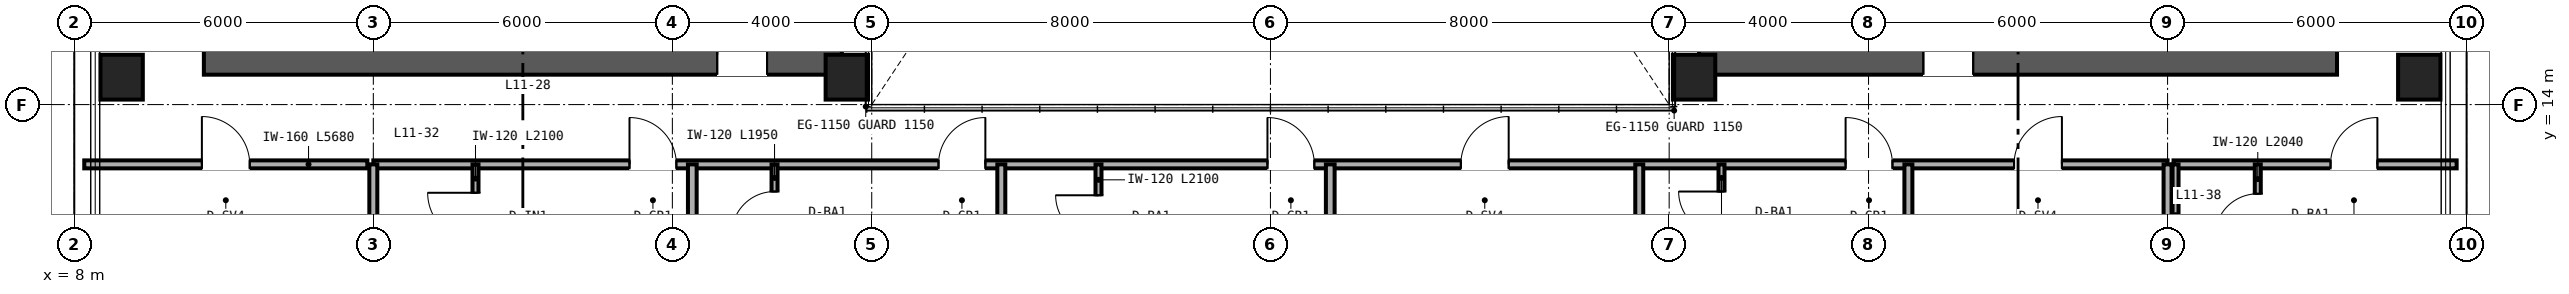
"""IFC4 building model, lengths in metres.
Left out: names, types, materials, properties, quantities, classifications, styles, units other than length and angle.
Written with IfcOpenShell. Run it as: python <this file> out.ifc"""

import sys

from ifc_helpers import new_model, si_unit, direction, frame, frame_2d, origin, origin_2d, place, context, subcontext, project, spatial, rectangle, hollow_rectangle, extrude, source, transform, mapped, element, fill, save


model = new_model("IFC4")
c1 = context("Model", 3, precision=1e-05, world=origin(), true_north=direction((0.0, 1.0)))
c2 = subcontext(c1, "Body", "Model", "MODEL_VIEW")
j1 = project(units=[si_unit("LENGTHUNIT", "METRE"), si_unit("PLANEANGLEUNIT", "RADIAN")], contexts=[c1])
p1 = place(None, origin())
s1 = spatial("IfcSite", under=j1, at=p1, CompositionType="ELEMENT")
p2 = place(p1, origin())
s2 = spatial("IfcBuilding", under=s1, at=p2, CompositionType="ELEMENT")
p3 = place(p2, frame((0.0, 0.0, 49.2)))
s3 = spatial("IfcBuildingStorey", under=s2, at=p3, CompositionType="ELEMENT", Elevation=49.2)
p4 = place(p3, frame((10.6, 15.0, 0.0), z_axis=(0.0, 0.0, 1.0), x_axis=(1.0, 0.0, 0.0)))
e1 = element("IfcWall", 1, at=p4, inside=s3, PredefinedType="SHEAR", context=c2, shape_type="SweptSolid", body=[
    extrude(rectangle(XDim=12.8, YDim=0.8, at=frame_2d((6.4, 0.0))), origin(), (0.0, 0.0, 1.0), 3.35),
])
p5 = place(p4, frame((10.3, 0.0, 0.0)))
e2 = element("IfcOpeningElement", 2, at=p5, cuts=e1, PredefinedType="OPENING", context=c2, shape_type="SweptSolid", body=[
    extrude(rectangle(XDim=1.0, YDim=2.15, at=frame_2d((0.5, 1.075))), frame((0.0, 0.41, 0.0), z_axis=(0.0, -1.0, 0.0), x_axis=(1.0, 0.0, 0.0)), (0.0, 0.0, 1.0), 0.82),
])
p6 = place(p3, frame((40.6, 15.0, 0.0), z_axis=(0.0, 0.0, 1.0), x_axis=(1.0, 0.0, 0.0)))
e3 = element("IfcWall", 3, at=p6, inside=s3, PredefinedType="SHEAR", context=c2, shape_type="SweptSolid", body=[
    extrude(rectangle(XDim=12.8, YDim=0.8, at=frame_2d((6.4, 0.0))), origin(), (0.0, 0.0, 1.0), 3.35),
])
p7 = place(p6, frame((4.5, 0.0, 0.0)))
e4 = element("IfcOpeningElement", 4, at=p7, cuts=e3, PredefinedType="OPENING", context=c2, shape_type="SweptSolid", body=[
    extrude(rectangle(XDim=1.0, YDim=2.15, at=frame_2d((0.5, 1.075))), frame((0.0, 0.41, 0.0), z_axis=(0.0, -1.0, 0.0), x_axis=(1.0, 0.0, 0.0)), (0.0, 0.0, 1.0), 0.82),
])
m1 = source(origin(), c2, "Body", "SweptSolid", [
    extrude(hollow_rectangle(XDim=0.85, YDim=0.9, WallThickness=0.04, at=origin_2d()), origin(), (0.0, 0.0, 1.0), 3.35),
])
for number, where, z_axis, x_axis in (
    (5, (8.95, 14.55, 0.0), (0.0, 0.0, 1.0), (1.0, 0.0, 0.0)),
    (6, (23.5, 14.55, 0.0), (0.0, 0.0, 1.0), (1.0, 0.0, 0.0)),
    (7, (40.5, 14.55, 0.0), (0.0, 0.0, 1.0), (1.0, 0.0, 0.0)),
    (8, (55.05, 14.55, 0.0), (0.0, 0.0, 1.0), (1.0, 0.0, 0.0)),
):
    element("IfcColumn", number, at=place(p3, frame(where, z_axis=z_axis, x_axis=x_axis)), inside=s3, PredefinedType="COLUMN", context=c2, shape_type="MappedRepresentation", body=[
        mapped(m1, transform((0.0, 0.0, 0.0), scale=1.0)),
    ])
p8 = place(p3, frame((8.2, 12.8, 0.0), z_axis=(0.0, 0.0, 1.0), x_axis=(1.0, 0.0, 0.0)))
e9 = element("IfcWall", 9, at=p8, inside=s3, PredefinedType="PARTITIONING", context=c2, shape_type="SweptSolid", body=[
    extrude(rectangle(XDim=5.68, YDim=0.16, at=frame_2d((2.84, 0.0))), origin(), (0.0, 0.0, 1.0), 3.35),
])
p9 = place(p8, frame((2.36, 0.0, 0.0)))
e10 = element("IfcOpeningElement", 10, at=p9, cuts=e9, PredefinedType="OPENING", context=c2, shape_type="SweptSolid", body=[
    extrude(rectangle(XDim=0.96, YDim=2.15, at=frame_2d((0.48, 1.075))), frame((0.0, 0.09, 0.0), z_axis=(0.0, -1.0, 0.0), x_axis=(1.0, 0.0, 0.0)), (0.0, 0.0, 1.0), 0.18),
])
p10 = place(p3, frame((50.12, 12.8, 0.0), z_axis=(0.0, 0.0, 1.0), x_axis=(1.0, 0.0, 0.0)))
e11 = element("IfcWall", 11, at=p10, inside=s3, PredefinedType="PARTITIONING", context=c2, shape_type="SweptSolid", body=[
    extrude(rectangle(XDim=5.68, YDim=0.16, at=frame_2d((2.84, 0.0))), origin(), (0.0, 0.0, 1.0), 3.35),
])
p11 = place(p10, frame((3.15, 0.0, 0.0)))
e12 = element("IfcOpeningElement", 12, at=p11, cuts=e11, PredefinedType="OPENING", context=c2, shape_type="SweptSolid", body=[
    extrude(rectangle(XDim=0.94, YDim=2.15, at=frame_2d((0.47, 1.075))), frame((0.0, 0.09, 0.0), z_axis=(0.0, -1.0, 0.0), x_axis=(1.0, 0.0, 0.0)), (0.0, 0.0, 1.0), 0.18),
])
p12 = place(p3, frame((51.81, 10.76, 0.0), z_axis=(0.0, 0.0, 1.0), x_axis=(0.0, 1.0, 0.0)))
e13 = element("IfcWall", 13, at=p12, inside=s3, PredefinedType="PARTITIONING", context=c2, shape_type="SweptSolid", body=[
    extrude(rectangle(XDim=2.04, YDim=0.12, at=frame_2d((1.02, 0.0))), origin(), (0.0, 0.0, 1.0), 3.35),
])
p13 = place(p12, frame((0.59, 0.0, 0.0)))
e14 = element("IfcOpeningElement", 14, at=p13, cuts=e13, PredefinedType="OPENING", context=c2, shape_type="SweptSolid", body=[
    extrude(rectangle(XDim=0.86, YDim=2.1, at=frame_2d((0.43, 1.05))), frame((0.0, 0.07, 0.0), z_axis=(0.0, -1.0, 0.0), x_axis=(1.0, 0.0, 0.0)), (0.0, 0.0, 1.0), 0.14),
])
p14 = place(p3, frame((50.16, 10.76, 0.0), z_axis=(0.0, 0.0, 1.0), x_axis=(0.0, 1.0, 0.0)))
e15 = element("IfcWall", 15, at=p14, inside=s3, PredefinedType="PARTITIONING", context=c2, shape_type="SweptSolid", body=[
    extrude(rectangle(XDim=2.04, YDim=0.12, at=frame_2d((1.02, 0.0))), origin(), (0.0, 0.0, 1.0), 3.35),
])
p15 = place(p3, frame((14.0, 12.8, 0.0), z_axis=(0.0, 0.0, 1.0), x_axis=(1.0, 0.0, 0.0)))
e16 = element("IfcWall", 16, at=p15, inside=s3, PredefinedType="PARTITIONING", context=c2, shape_type="SweptSolid", body=[
    extrude(rectangle(XDim=36.0, YDim=0.16, at=frame_2d((18.0, 0.0))), origin(), (0.0, 0.0, 1.0), 2.571),
])
p16 = place(p15, frame((5.14, 0.0, 0.0)))
e17 = element("IfcOpeningElement", 17, at=p16, cuts=e16, PredefinedType="OPENING", context=c2, shape_type="SweptSolid", body=[
    extrude(rectangle(XDim=0.94, YDim=2.15, at=frame_2d((0.47, 1.075))), frame((0.0, 0.09, 0.0), z_axis=(0.0, -1.0, 0.0), x_axis=(1.0, 0.0, 0.0)), (0.0, 0.0, 1.0), 0.18),
])
p17 = place(p15, frame((11.34, 0.0, 0.0)))
e18 = element("IfcOpeningElement", 18, at=p17, cuts=e16, PredefinedType="OPENING", context=c2, shape_type="SweptSolid", body=[
    extrude(rectangle(XDim=0.94, YDim=2.15, at=frame_2d((0.47, 1.075))), frame((0.0, 0.09, 0.0), z_axis=(0.0, -1.0, 0.0), x_axis=(1.0, 0.0, 0.0)), (0.0, 0.0, 1.0), 0.18),
])
p18 = place(p15, frame((17.94, 0.0, 0.0)))
e19 = element("IfcOpeningElement", 19, at=p18, cuts=e16, PredefinedType="OPENING", context=c2, shape_type="SweptSolid", body=[
    extrude(rectangle(XDim=0.94, YDim=2.15, at=frame_2d((0.47, 1.075))), frame((0.0, 0.09, 0.0), z_axis=(0.0, -1.0, 0.0), x_axis=(1.0, 0.0, 0.0)), (0.0, 0.0, 1.0), 0.18),
])
p19 = place(p15, frame((21.82, 0.0, 0.0)))
e20 = element("IfcOpeningElement", 20, at=p19, cuts=e16, PredefinedType="OPENING", context=c2, shape_type="SweptSolid", body=[
    extrude(rectangle(XDim=0.96, YDim=2.15, at=frame_2d((0.48, 1.075))), frame((0.0, 0.09, 0.0), z_axis=(0.0, -1.0, 0.0), x_axis=(1.0, 0.0, 0.0)), (0.0, 0.0, 1.0), 0.18),
])
p20 = place(p15, frame((29.54, 0.0, 0.0)))
e21 = element("IfcOpeningElement", 21, at=p20, cuts=e16, PredefinedType="OPENING", context=c2, shape_type="SweptSolid", body=[
    extrude(rectangle(XDim=0.94, YDim=2.15, at=frame_2d((0.47, 1.075))), frame((0.0, 0.09, 0.0), z_axis=(0.0, -1.0, 0.0), x_axis=(1.0, 0.0, 0.0)), (0.0, 0.0, 1.0), 0.18),
])
p21 = place(p15, frame((32.92, 0.0, 0.0)))
e22 = element("IfcOpeningElement", 22, at=p21, cuts=e16, PredefinedType="OPENING", context=c2, shape_type="SweptSolid", body=[
    extrude(rectangle(XDim=0.96, YDim=2.15, at=frame_2d((0.48, 1.075))), frame((0.0, 0.09, 0.0), z_axis=(0.0, -1.0, 0.0), x_axis=(1.0, 0.0, 0.0)), (0.0, 0.0, 1.0), 0.18),
])
for number, where, z_axis, x_axis in (
    (23, (14.0, 2.36, 0.0), (0.0, 0.0, 1.0), (0.0, 1.0, 0.0)),
    (24, (50.0, 2.36, 0.0), (0.0, 0.0, 1.0), (0.0, 1.0, 0.0)),
):
    element("IfcWall", number, at=place(p3, frame(where, z_axis=z_axis, x_axis=x_axis)), inside=s3, PredefinedType="PARTITIONING", context=c2, shape_type="SweptSolid", body=[
        extrude(rectangle(XDim=10.44, YDim=0.16, at=frame_2d((5.22, 0.0))), origin(), (0.0, 0.0, 1.0), 2.657),
    ])
p22 = place(p3, frame((20.4, 2.36, 0.0), z_axis=(0.0, 0.0, 1.0), x_axis=(0.0, 1.0, 0.0)))
e25 = element("IfcWall", 25, at=p22, inside=s3, PredefinedType="PARTITIONING", context=c2, shape_type="SweptSolid", body=[
    extrude(rectangle(XDim=10.44, YDim=0.175, at=frame_2d((5.22, 0.0))), origin(), (0.0, 0.0, 1.0), 2.813),
])
p23 = place(p3, frame((16.05, 10.7, 0.0), z_axis=(0.0, 0.0, 1.0), x_axis=(0.0, 1.0, 0.0)))
e26 = element("IfcWall", 26, at=p23, inside=s3, PredefinedType="PARTITIONING", context=c2, shape_type="SweptSolid", body=[
    extrude(rectangle(XDim=2.1, YDim=0.12, at=frame_2d((1.05, 0.0))), origin(), (0.0, 0.0, 1.0), 3.35),
])
p24 = place(p23, frame((0.57, 0.0, 0.0)))
e27 = element("IfcOpeningElement", 27, at=p24, cuts=e26, PredefinedType="OPENING", context=c2, shape_type="SweptSolid", body=[
    extrude(rectangle(XDim=0.96, YDim=2.15, at=frame_2d((0.48, 1.075))), frame((0.0, 0.07, 0.0), z_axis=(0.0, -1.0, 0.0), x_axis=(1.0, 0.0, 0.0)), (0.0, 0.0, 1.0), 0.14),
])
p25 = place(p3, frame((26.6, 2.36, 0.0), z_axis=(0.0, 0.0, 1.0), x_axis=(0.0, 1.0, 0.0)))
e28 = element("IfcWall", 28, at=p25, inside=s3, PredefinedType="PARTITIONING", context=c2, shape_type="SweptSolid", body=[
    extrude(rectangle(XDim=10.44, YDim=0.16, at=frame_2d((5.22, 0.0))), origin(), (0.0, 0.0, 1.0), 2.423),
])
p26 = place(p3, frame((22.05, 10.85, 0.0), z_axis=(0.0, 0.0, 1.0), x_axis=(0.0, 1.0, 0.0)))
e29 = element("IfcWall", 29, at=p26, inside=s3, PredefinedType="PARTITIONING", context=c2, shape_type="SweptSolid", body=[
    extrude(rectangle(XDim=1.95, YDim=0.12, at=frame_2d((0.975, 0.0))), origin(), (0.0, 0.0, 1.0), 3.35),
])
p27 = place(p26, frame((0.545, 0.0, 0.0)))
e30 = element("IfcOpeningElement", 30, at=p27, cuts=e29, PredefinedType="OPENING", context=c2, shape_type="SweptSolid", body=[
    extrude(rectangle(XDim=0.86, YDim=2.1, at=frame_2d((0.43, 1.05))), frame((0.0, 0.07, 0.0), z_axis=(0.0, -1.0, 0.0), x_axis=(1.0, 0.0, 0.0)), (0.0, 0.0, 1.0), 0.14),
])
p28 = place(p3, frame((33.2, 2.36, 0.0), z_axis=(0.0, 0.0, 1.0), x_axis=(0.0, 1.0, 0.0)))
e31 = element("IfcWall", 31, at=p28, inside=s3, PredefinedType="PARTITIONING", context=c2, shape_type="SweptSolid", body=[
    extrude(rectangle(XDim=10.44, YDim=0.175, at=frame_2d((5.22, 0.0))), origin(), (0.0, 0.0, 1.0), 2.423),
])
p29 = place(p3, frame((28.55, 10.7, 0.0), z_axis=(0.0, 0.0, 1.0), x_axis=(0.0, 1.0, 0.0)))
e32 = element("IfcWall", 32, at=p29, inside=s3, PredefinedType="PARTITIONING", context=c2, shape_type="SweptSolid", body=[
    extrude(rectangle(XDim=2.1, YDim=0.12, at=frame_2d((1.05, 0.0))), origin(), (0.0, 0.0, 1.0), 3.35),
])
p30 = place(p29, frame((0.62, 0.0, 0.0)))
e33 = element("IfcOpeningElement", 33, at=p30, cuts=e32, PredefinedType="OPENING", context=c2, shape_type="SweptSolid", body=[
    extrude(rectangle(XDim=0.86, YDim=2.1, at=frame_2d((0.43, 1.05))), frame((0.0, 0.07, 0.0), z_axis=(0.0, -1.0, 0.0), x_axis=(1.0, 0.0, 0.0)), (0.0, 0.0, 1.0), 0.14),
])
p31 = place(p3, frame((39.4, 2.36, 0.0), z_axis=(0.0, 0.0, 1.0), x_axis=(0.0, 1.0, 0.0)))
e34 = element("IfcWall", 34, at=p31, inside=s3, PredefinedType="PARTITIONING", context=c2, shape_type="SweptSolid", body=[
    extrude(rectangle(XDim=10.44, YDim=0.16, at=frame_2d((5.22, 0.0))), origin(), (0.0, 0.0, 1.0), 2.423),
])
p32 = place(p3, frame((44.8, 2.36, 0.0), z_axis=(0.0, 0.0, 1.0), x_axis=(0.0, 1.0, 0.0)))
e35 = element("IfcWall", 35, at=p32, inside=s3, PredefinedType="PARTITIONING", context=c2, shape_type="SweptSolid", body=[
    extrude(rectangle(XDim=10.44, YDim=0.16, at=frame_2d((5.22, 0.0))), origin(), (0.0, 0.0, 1.0), 2.657),
])
p33 = place(p3, frame((41.05, 10.85, 0.0), z_axis=(0.0, 0.0, 1.0), x_axis=(0.0, 1.0, 0.0)))
e36 = element("IfcWall", 36, at=p33, inside=s3, PredefinedType="PARTITIONING", context=c2, shape_type="SweptSolid", body=[
    extrude(rectangle(XDim=1.95, YDim=0.12, at=frame_2d((0.975, 0.0))), origin(), (0.0, 0.0, 1.0), 3.35),
])
p34 = place(p33, frame((0.545, 0.0, 0.0)))
e37 = element("IfcOpeningElement", 37, at=p34, cuts=e36, PredefinedType="OPENING", context=c2, shape_type="SweptSolid", body=[
    extrude(rectangle(XDim=0.86, YDim=2.1, at=frame_2d((0.43, 1.05))), frame((0.0, 0.07, 0.0), z_axis=(0.0, -1.0, 0.0), x_axis=(1.0, 0.0, 0.0)), (0.0, 0.0, 1.0), 0.14),
])
m2 = source(origin(), c2, "Body", "SweptSolid", [
    extrude(rectangle(XDim=1.0, YDim=2.15, at=frame_2d((0.5, 1.075))), frame((0.0, 0.025, 0.0), z_axis=(0.0, -1.0, 0.0), x_axis=(1.0, 0.0, 0.0)), (0.0, 0.0, 1.0), 0.05),
])
p35 = place(p5, origin())
e38 = element("IfcDoor", 38, at=p35, inside=s3, OperationType="SINGLE_SWING_LEFT", PredefinedType="DOOR", context=c2, shape_type="MappedRepresentation", body=[
    mapped(m2, transform((0.0, 0.0, 0.0), scale=1.0)),
])
fill(e2, e38)
p36 = place(p7, origin())
e39 = element("IfcDoor", 39, at=p36, inside=s3, OperationType="SINGLE_SWING_RIGHT", PredefinedType="DOOR", context=c2, shape_type="MappedRepresentation", body=[
    mapped(m2, transform((0.0, 0.0, 0.0), scale=1.0)),
])
fill(e4, e39)
m3 = source(origin(), c2, "Body", "SweptSolid", [
    extrude(rectangle(XDim=0.96, YDim=2.15, at=frame_2d((0.48, 1.075))), frame((0.0, 0.025, 0.0), z_axis=(0.0, -1.0, 0.0), x_axis=(1.0, 0.0, 0.0)), (0.0, 0.0, 1.0), 0.05),
])
p37 = place(p9, origin())
e40 = element("IfcDoor", 40, at=p37, inside=s3, OperationType="SINGLE_SWING_LEFT", PredefinedType="DOOR", context=c2, shape_type="MappedRepresentation", body=[
    mapped(m3, transform((0.0, 0.0, 0.0), scale=1.0)),
])
fill(e10, e40)
m4 = source(origin(), c2, "Body", "SweptSolid", [
    extrude(rectangle(XDim=0.86, YDim=2.1, at=frame_2d((0.43, 1.05))), frame((0.0, 0.025, 0.0), z_axis=(0.0, -1.0, 0.0), x_axis=(1.0, 0.0, 0.0)), (0.0, 0.0, 1.0), 0.05),
])
p38 = place(p13, origin())
e41 = element("IfcDoor", 41, at=p38, inside=s3, OperationType="SINGLE_SWING_LEFT", PredefinedType="DOOR", context=c2, shape_type="MappedRepresentation", body=[
    mapped(m4, transform((0.0, 0.0, 0.0), scale=1.0)),
])
fill(e14, e41)
m5 = source(origin(), c2, "Body", "SweptSolid", [
    extrude(rectangle(XDim=0.94, YDim=2.15, at=frame_2d((0.47, 1.075))), frame((0.0, 0.025, 0.0), z_axis=(0.0, -1.0, 0.0), x_axis=(1.0, 0.0, 0.0)), (0.0, 0.0, 1.0), 0.05),
])
p39 = place(p11, origin())
e42 = element("IfcDoor", 42, at=p39, inside=s3, OperationType="SINGLE_SWING_RIGHT", PredefinedType="DOOR", context=c2, shape_type="MappedRepresentation", body=[
    mapped(m5, transform((0.0, 0.0, 0.0), scale=1.0)),
])
fill(e12, e42)
p40 = place(p24, origin())
e43 = element("IfcDoor", 43, at=p40, inside=s3, OperationType="SINGLE_SWING_RIGHT", PredefinedType="DOOR", context=c2, shape_type="MappedRepresentation", body=[
    mapped(m3, transform((0.0, 0.0, 0.0), scale=1.0)),
])
fill(e27, e43)
p41 = place(p27, origin())
e44 = element("IfcDoor", 44, at=p41, inside=s3, OperationType="SINGLE_SWING_LEFT", PredefinedType="DOOR", context=c2, shape_type="MappedRepresentation", body=[
    mapped(m4, transform((0.0, 0.0, 0.0), scale=1.0)),
])
fill(e30, e44)
p42 = place(p30, origin())
e45 = element("IfcDoor", 45, at=p42, inside=s3, OperationType="SINGLE_SWING_RIGHT", PredefinedType="DOOR", context=c2, shape_type="MappedRepresentation", body=[
    mapped(m4, transform((0.0, 0.0, 0.0), scale=1.0)),
])
fill(e33, e45)
p43 = place(p34, origin())
e46 = element("IfcDoor", 46, at=p43, inside=s3, OperationType="SINGLE_SWING_RIGHT", PredefinedType="DOOR", context=c2, shape_type="MappedRepresentation", body=[
    mapped(m4, transform((0.0, 0.0, 0.0), scale=1.0)),
])
fill(e37, e46)
p44 = place(p16, origin())
e47 = element("IfcDoor", 47, at=p44, inside=s3, OperationType="SINGLE_SWING_LEFT", PredefinedType="DOOR", context=c2, shape_type="MappedRepresentation", body=[
    mapped(m5, transform((0.0, 0.0, 0.0), scale=1.0)),
])
fill(e17, e47)
p45 = place(p17, origin())
e48 = element("IfcDoor", 48, at=p45, inside=s3, OperationType="SINGLE_SWING_RIGHT", PredefinedType="DOOR", context=c2, shape_type="MappedRepresentation", body=[
    mapped(m5, transform((0.0, 0.0, 0.0), scale=1.0)),
])
fill(e18, e48)
p46 = place(p18, origin())
e49 = element("IfcDoor", 49, at=p46, inside=s3, OperationType="SINGLE_SWING_LEFT", PredefinedType="DOOR", context=c2, shape_type="MappedRepresentation", body=[
    mapped(m5, transform((0.0, 0.0, 0.0), scale=1.0)),
])
fill(e19, e49)
p47 = place(p19, origin())
e50 = element("IfcDoor", 50, at=p47, inside=s3, OperationType="SINGLE_SWING_RIGHT", PredefinedType="DOOR", context=c2, shape_type="MappedRepresentation", body=[
    mapped(m3, transform((0.0, 0.0, 0.0), scale=1.0)),
])
fill(e20, e50)
p48 = place(p20, origin())
e51 = element("IfcDoor", 51, at=p48, inside=s3, OperationType="SINGLE_SWING_LEFT", PredefinedType="DOOR", context=c2, shape_type="MappedRepresentation", body=[
    mapped(m5, transform((0.0, 0.0, 0.0), scale=1.0)),
])
fill(e21, e51)
p49 = place(p21, origin())
e52 = element("IfcDoor", 52, at=p49, inside=s3, OperationType="SINGLE_SWING_RIGHT", PredefinedType="DOOR", context=c2, shape_type="MappedRepresentation", body=[
    mapped(m3, transform((0.0, 0.0, 0.0), scale=1.0)),
])
fill(e22, e52)
save(model, sys.argv[1])
